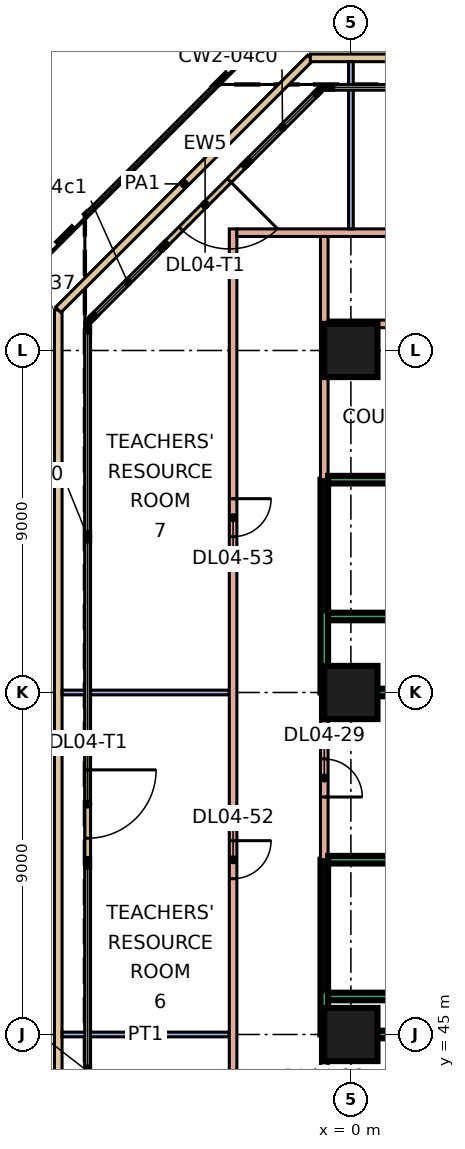
"""IFC4 building model, lengths in metres.
Left out: names, types, materials, properties, quantities, classifications, styles, units other than length and angle.
Written with IfcOpenShell. Run it as: python <this file> out.ifc"""

import sys

from ifc_helpers import new_model, si_unit, direction, frame, frame_2d, origin, origin_2d, place, context, subcontext, project, spatial, rectangle, extrude, element, fill, save


model = new_model("IFC4")
c1 = context("Model", 3, precision=1e-05, world=origin(), true_north=direction((0.0, 1.0)))
c2 = subcontext(c1, "Body", "Model", "MODEL_VIEW")
j1 = project(units=[si_unit("LENGTHUNIT", "METRE"), si_unit("PLANEANGLEUNIT", "RADIAN")], contexts=[c1])
p1 = place(None, origin())
s1 = spatial("IfcSite", under=j1, at=p1, CompositionType="ELEMENT")
p2 = place(p1, origin())
s2 = spatial("IfcBuilding", under=s1, at=p2, CompositionType="ELEMENT")
p3 = place(p2, frame((0.0, 0.0, 21.6)))
s3 = spatial("IfcBuildingStorey", under=s2, at=p3, CompositionType="ELEMENT", Elevation=21.6)
for number, where, z_axis, x_axis in (
    (1, (0.0, 45.0, 0.0), (0.0, 0.0, 1.0), (1.0, 0.0, 0.0)),
    (2, (0.0, 54.0, 0.0), (0.0, 0.0, 1.0), (1.0, 0.0, 0.0)),
    (3, (0.0, 63.0, 0.0), (0.0, 0.0, 1.0), (1.0, 0.0, 0.0)),
):
    element("IfcColumn", number, at=place(p3, frame(where, z_axis=z_axis, x_axis=x_axis)), inside=s3, PredefinedType="COLUMN", context=c2, shape_type="SweptSolid", body=[
        extrude(rectangle(XDim=1.4, YDim=1.4, at=origin_2d()), origin(), (0.0, 0.0, 1.0), 4.8),
    ])
p4 = place(p3, frame((-2.775, 67.897, 0.0), z_axis=(0.0, 0.0, 1.0), x_axis=(-0.707106781187, -0.707106781187, 0.0)))
e4 = element("IfcWall", 4, at=p4, inside=s3, PredefinedType="SOLIDWALL", context=c2, shape_type="SweptSolid", body=[
    extrude(rectangle(XDim=3.0, YDim=0.15, at=frame_2d((1.5, 0.0))), origin(), (0.0, 0.0, 1.0), 4.4),
])
p5 = place(p4, frame((0.6, 0.0, 0.0)))
e5 = element("IfcOpeningElement", 5, at=p5, cuts=e4, PredefinedType="OPENING", context=c2, shape_type="SweptSolid", body=[
    extrude(rectangle(XDim=1.8, YDim=2.4, at=frame_2d((0.9, 1.2))), frame((0.0, 0.085, 0.0), z_axis=(0.0, -1.0, 0.0), x_axis=(1.0, 0.0, 0.0)), (0.0, 0.0, 1.0), 0.17),
])
p6 = place(p3, frame((-6.925, 52.564, 0.0), z_axis=(0.0, 0.0, 1.0), x_axis=(0.0, -1.0, 0.0)))
e6 = element("IfcWall", 6, at=p6, inside=s3, PredefinedType="SOLIDWALL", context=c2, shape_type="SweptSolid", body=[
    extrude(rectangle(XDim=3.0, YDim=0.15, at=frame_2d((1.5, 0.0))), origin(), (0.0, 0.0, 1.0), 4.4),
])
p7 = place(p6, frame((0.6, 0.0, 0.0)))
e7 = element("IfcOpeningElement", 7, at=p7, cuts=e6, PredefinedType="OPENING", context=c2, shape_type="SweptSolid", body=[
    extrude(rectangle(XDim=1.8, YDim=2.4, at=frame_2d((0.9, 1.2))), frame((0.0, 0.085, 0.0), z_axis=(0.0, -1.0, 0.0), x_axis=(1.0, 0.0, 0.0)), (0.0, 0.0, 1.0), 0.17),
])
p8 = place(p3, frame((-7.7, 9.932, 0.0), z_axis=(0.0, 0.0, 1.0), x_axis=(0.0, 1.0, 0.0)))
e8 = element("IfcWall", 8, at=p8, inside=s3, PredefinedType="PARAPET", context=c2, shape_type="SweptSolid", body=[
    extrude(rectangle(XDim=54.136, YDim=0.2, at=frame_2d((27.068, 0.0))), origin(), (0.0, 0.0, 1.0), 0.5),
])
p9 = place(p3, frame((-7.7, 64.068, 0.0), z_axis=(0.0, 0.0, 1.0), x_axis=(0.707106781187, 0.707106781187, 0.0)))
e9 = element("IfcWall", 9, at=p9, inside=s3, PredefinedType="PARAPET", context=c2, shape_type="SweptSolid", body=[
    extrude(rectangle(XDim=9.379, YDim=0.2, at=frame_2d((4.689, 0.0))), origin(), (0.0, 0.0, 1.0), 0.5),
])
p10 = place(p3, frame((-1.068, 70.7, 0.0), z_axis=(0.0, 0.0, 1.0), x_axis=(1.0, 0.0, 0.0)))
e10 = element("IfcWall", 10, at=p10, inside=s3, PredefinedType="PARAPET", context=c2, shape_type="SweptSolid", body=[
    extrude(rectangle(XDim=26.136, YDim=0.2, at=frame_2d((13.068, 0.0))), origin(), (0.0, 0.0, 1.0), 0.5),
])
for number, where, z_axis, x_axis in (
    (11, (-7.6, 45.0, 0.0), (0.0, 0.0, 1.0), (1.0, 0.0, 0.0)),
    (12, (-7.6, 54.0, 0.0), (0.0, 0.0, 1.0), (1.0, 0.0, 0.0)),
):
    element("IfcWall", number, at=place(p3, frame(where, z_axis=z_axis, x_axis=x_axis)), inside=s3, PredefinedType="PARTITIONING", context=c2, shape_type="SweptSolid", body=[
        extrude(rectangle(XDim=4.4, YDim=0.125, at=frame_2d((2.2, 0.0))), origin(), (0.0, 0.0, 1.0), 4.4),
    ])
p11 = place(p3, frame((-3.1, 5.473, 0.0), z_axis=(0.0, 0.0, 1.0), x_axis=(0.0, 1.0, 0.0)))
e13 = element("IfcWall", 13, at=p11, inside=s3, PredefinedType="PARTITIONING", context=c2, shape_type="SweptSolid", body=[
    extrude(rectangle(XDim=60.727, YDim=0.2, at=frame_2d((30.363, 0.0))), origin(), (0.0, 0.0, 1.0), 4.4),
])
p12 = place(p11, frame((12.127, 0.0, 0.0)))
e14 = element("IfcOpeningElement", 14, at=p12, cuts=e13, PredefinedType="OPENING", context=c2, shape_type="SweptSolid", body=[
    extrude(rectangle(XDim=1.0, YDim=2.1, at=frame_2d((0.5, 1.05))), frame((0.0, 0.11, 0.0), z_axis=(0.0, -1.0, 0.0), x_axis=(1.0, 0.0, 0.0)), (0.0, 0.0, 1.0), 0.22),
])
p13 = place(p11, frame((24.127, 0.0, 0.0)))
e15 = element("IfcOpeningElement", 15, at=p13, cuts=e13, PredefinedType="OPENING", context=c2, shape_type="SweptSolid", body=[
    extrude(rectangle(XDim=1.0, YDim=2.1, at=frame_2d((0.5, 1.05))), frame((0.0, 0.11, 0.0), z_axis=(0.0, -1.0, 0.0), x_axis=(1.0, 0.0, 0.0)), (0.0, 0.0, 1.0), 0.22),
])
p14 = place(p11, frame((34.627, 0.0, 0.0)))
e16 = element("IfcOpeningElement", 16, at=p14, cuts=e13, PredefinedType="OPENING", context=c2, shape_type="SweptSolid", body=[
    extrude(rectangle(XDim=1.0, YDim=2.1, at=frame_2d((0.5, 1.05))), frame((0.0, 0.11, 0.0), z_axis=(0.0, -1.0, 0.0), x_axis=(1.0, 0.0, 0.0)), (0.0, 0.0, 1.0), 0.22),
])
p15 = place(p11, frame((43.627, 0.0, 0.0)))
e17 = element("IfcOpeningElement", 17, at=p15, cuts=e13, PredefinedType="OPENING", context=c2, shape_type="SweptSolid", body=[
    extrude(rectangle(XDim=1.0, YDim=2.1, at=frame_2d((0.5, 1.05))), frame((0.0, 0.11, 0.0), z_axis=(0.0, -1.0, 0.0), x_axis=(1.0, 0.0, 0.0)), (0.0, 0.0, 1.0), 0.22),
])
p16 = place(p11, frame((52.627, 0.0, 0.0)))
e18 = element("IfcOpeningElement", 18, at=p16, cuts=e13, PredefinedType="OPENING", context=c2, shape_type="SweptSolid", body=[
    extrude(rectangle(XDim=1.0, YDim=2.1, at=frame_2d((0.5, 1.05))), frame((0.0, 0.11, 0.0), z_axis=(0.0, -1.0, 0.0), x_axis=(1.0, 0.0, 0.0)), (0.0, 0.0, 1.0), 0.22),
])
p17 = place(p3, frame((-3.0, 66.1, 0.0), z_axis=(0.0, 0.0, 1.0), x_axis=(1.0, 0.0, 0.0)))
e19 = element("IfcWall", 19, at=p17, inside=s3, PredefinedType="PARTITIONING", context=c2, shape_type="SweptSolid", body=[
    extrude(rectangle(XDim=30.0, YDim=0.2, at=frame_2d((15.0, 0.0))), origin(), (0.0, 0.0, 1.0), 4.4),
])
p18 = place(p17, frame((8.6, 0.0, 0.0)))
e20 = element("IfcOpeningElement", 20, at=p18, cuts=e19, PredefinedType="OPENING", context=c2, shape_type="SweptSolid", body=[
    extrude(rectangle(XDim=1.0, YDim=2.1, at=frame_2d((0.5, 1.05))), frame((0.0, 0.11, 0.0), z_axis=(0.0, -1.0, 0.0), x_axis=(1.0, 0.0, 0.0)), (0.0, 0.0, 1.0), 0.22),
])
p19 = place(p17, frame((22.35, 0.0, 0.0)))
e21 = element("IfcOpeningElement", 21, at=p19, cuts=e19, PredefinedType="OPENING", context=c2, shape_type="SweptSolid", body=[
    extrude(rectangle(XDim=1.0, YDim=2.1, at=frame_2d((0.5, 1.05))), frame((0.0, 0.11, 0.0), z_axis=(0.0, -1.0, 0.0), x_axis=(1.0, 0.0, 0.0)), (0.0, 0.0, 1.0), 0.22),
])
p20 = place(p3, frame((-0.7, 40.6, 0.0), z_axis=(0.0, 0.0, 1.0), x_axis=(0.0, 1.0, 0.0)))
e22 = element("IfcWall", 22, at=p20, inside=s3, PredefinedType="PARTITIONING", context=c2, shape_type="SweptSolid", body=[
    extrude(rectangle(XDim=4.4, YDim=0.2, at=frame_2d((2.2, 0.0))), origin(), (0.0, 0.0, 1.0), 4.4),
])
p21 = place(p20, frame((1.65, 0.0, 0.0)))
e23 = element("IfcOpeningElement", 23, at=p21, cuts=e22, PredefinedType="OPENING", context=c2, shape_type="SweptSolid", body=[
    extrude(rectangle(XDim=1.0, YDim=2.1, at=frame_2d((0.5, 1.05))), frame((0.0, 0.11, 0.0), z_axis=(0.0, -1.0, 0.0), x_axis=(1.0, 0.0, 0.0)), (0.0, 0.0, 1.0), 0.22),
])
p22 = place(p3, frame((-0.7, 45.0, 0.0), z_axis=(0.0, 0.0, 1.0), x_axis=(0.0, 1.0, 0.0)))
e24 = element("IfcWall", 24, at=p22, inside=s3, PredefinedType="SOLIDWALL", context=c2, shape_type="SweptSolid", body=[
    extrude(rectangle(XDim=4.6, YDim=0.2, at=frame_2d((2.3, 0.0))), origin(), (0.0, 0.0, 1.0), 4.4),
])
p23 = place(p3, frame((-0.7, 49.6, 0.0), z_axis=(0.0, 0.0, 1.0), x_axis=(0.0, 1.0, 0.0)))
e25 = element("IfcWall", 25, at=p23, inside=s3, PredefinedType="PARTITIONING", context=c2, shape_type="SweptSolid", body=[
    extrude(rectangle(XDim=4.4, YDim=0.2, at=frame_2d((2.2, 0.0))), origin(), (0.0, 0.0, 1.0), 4.4),
])
p24 = place(p23, frame((1.65, 0.0, 0.0)))
e26 = element("IfcOpeningElement", 26, at=p24, cuts=e25, PredefinedType="OPENING", context=c2, shape_type="SweptSolid", body=[
    extrude(rectangle(XDim=1.0, YDim=2.1, at=frame_2d((0.5, 1.05))), frame((0.0, 0.11, 0.0), z_axis=(0.0, -1.0, 0.0), x_axis=(1.0, 0.0, 0.0)), (0.0, 0.0, 1.0), 0.22),
])
p25 = place(p3, frame((-0.7, 54.0, 0.0), z_axis=(0.0, 0.0, 1.0), x_axis=(0.0, 1.0, 0.0)))
e27 = element("IfcWall", 27, at=p25, inside=s3, PredefinedType="SOLIDWALL", context=c2, shape_type="SweptSolid", body=[
    extrude(rectangle(XDim=5.6, YDim=0.2, at=frame_2d((2.8, 0.0))), origin(), (0.0, 0.0, 1.0), 4.4),
])
p26 = place(p3, frame((-0.7, 59.6, 0.0), z_axis=(0.0, 0.0, 1.0), x_axis=(0.0, 1.0, 0.0)))
e28 = element("IfcWall", 28, at=p26, inside=s3, PredefinedType="PARTITIONING", context=c2, shape_type="SweptSolid", body=[
    extrude(rectangle(XDim=6.4, YDim=0.2, at=frame_2d((3.2, 0.0))), origin(), (0.0, 0.0, 1.0), 4.4),
])
for number, where, z_axis, x_axis in (
    (29, (-0.6, 45.0, 0.0), (0.0, 0.0, 1.0), (1.0, 0.0, 0.0)),
    (30, (-0.6, 49.6, 0.0), (0.0, 0.0, 1.0), (1.0, 0.0, 0.0)),
    (31, (-0.6, 54.0, 0.0), (0.0, 0.0, 1.0), (1.0, 0.0, 0.0)),
    (32, (-0.6, 59.6, 0.0), (0.0, 0.0, 1.0), (1.0, 0.0, 0.0)),
):
    element("IfcWall", number, at=place(p3, frame(where, z_axis=z_axis, x_axis=x_axis)), inside=s3, PredefinedType="SOLIDWALL", context=c2, shape_type="SweptSolid", body=[
        extrude(rectangle(XDim=13.1, YDim=0.2, at=frame_2d((6.55, 0.0))), origin(), (0.0, 0.0, 1.0), 4.4),
    ])
p27 = place(p3, frame((-0.6, 63.7, 0.0), z_axis=(0.0, 0.0, 1.0), x_axis=(1.0, 0.0, 0.0)))
e33 = element("IfcWall", 33, at=p27, inside=s3, PredefinedType="PARTITIONING", context=c2, shape_type="SweptSolid", body=[
    extrude(rectangle(XDim=13.3, YDim=0.2, at=frame_2d((6.65, 0.0))), origin(), (0.0, 0.0, 1.0), 4.4),
])
p28 = place(p27, frame((6.05, 0.0, 0.0)))
e34 = element("IfcOpeningElement", 34, at=p28, cuts=e33, PredefinedType="OPENING", context=c2, shape_type="SweptSolid", body=[
    extrude(rectangle(XDim=1.0, YDim=2.1, at=frame_2d((0.5, 1.05))), frame((0.0, 0.11, 0.0), z_axis=(0.0, -1.0, 0.0), x_axis=(1.0, 0.0, 0.0)), (0.0, 0.0, 1.0), 0.22),
])
p29 = place(p3, frame((0.0, 66.2, 0.0), z_axis=(0.0, 0.0, 1.0), x_axis=(0.0, 1.0, 0.0)))
e35 = element("IfcWall", 35, at=p29, inside=s3, PredefinedType="PARTITIONING", context=c2, shape_type="SweptSolid", body=[
    extrude(rectangle(XDim=4.4, YDim=0.125, at=frame_2d((2.2, 0.0))), origin(), (0.0, 0.0, 1.0), 4.4),
])
for number, where, z_axis, x_axis in (
    (36, (-0.6, 56.0, 0.0), (0.0, 0.0, 1.0), (1.0, 0.0, 0.0)),
    (37, (-0.6, 46.0, 0.0), (0.0, 0.0, 1.0), (1.0, 0.0, 0.0)),
):
    element("IfcWall", number, at=place(p3, frame(where, z_axis=z_axis, x_axis=x_axis)), inside=s3, PredefinedType="SOLIDWALL", context=c2, shape_type="SweptSolid", body=[
        extrude(rectangle(XDim=7.945, YDim=0.2, at=frame_2d((3.973, 0.0))), origin(), (0.0, 0.0, 1.0), 4.4),
    ])
p30 = place(p5, origin())
e38 = element("IfcDoor", 38, at=p30, inside=s3, OperationType="DOUBLE_DOOR_SINGLE_SWING", PredefinedType="DOOR", context=c2, shape_type="SweptSolid", body=[
    extrude(rectangle(XDim=1.8, YDim=2.4, at=frame_2d((0.9, 1.2))), frame((0.0, 0.025, 0.0), z_axis=(0.0, -1.0, 0.0), x_axis=(1.0, 0.0, 0.0)), (0.0, 0.0, 1.0), 0.05),
])
fill(e5, e38)
p31 = place(p7, origin())
e39 = element("IfcDoor", 39, at=p31, inside=s3, OperationType="DOUBLE_DOOR_SINGLE_SWING", PredefinedType="DOOR", context=c2, shape_type="SweptSolid", body=[
    extrude(rectangle(XDim=1.8, YDim=2.4, at=frame_2d((0.9, 1.2))), frame((0.0, 0.025, 0.0), z_axis=(0.0, -1.0, 0.0), x_axis=(1.0, 0.0, 0.0)), (0.0, 0.0, 1.0), 0.05),
])
fill(e7, e39)
p32 = place(p24, frame((1.0, 0.0, 0.0), z_axis=(0.0, 0.0, 1.0), x_axis=(-1.0, 0.0, 0.0)))
e40 = element("IfcDoor", 40, at=p32, inside=s3, OperationType="SINGLE_SWING_LEFT", PredefinedType="DOOR", context=c2, shape_type="SweptSolid", body=[
    extrude(rectangle(XDim=1.0, YDim=2.1, at=frame_2d((0.5, 1.05))), frame((0.0, 0.025, 0.0), z_axis=(0.0, -1.0, 0.0), x_axis=(1.0, 0.0, 0.0)), (0.0, 0.0, 1.0), 0.05),
])
fill(e26, e40)
p33 = place(p15, origin())
e41 = element("IfcDoor", 41, at=p33, inside=s3, OperationType="SINGLE_SWING_RIGHT", PredefinedType="DOOR", context=c2, shape_type="SweptSolid", body=[
    extrude(rectangle(XDim=1.0, YDim=2.1, at=frame_2d((0.5, 1.05))), frame((0.0, 0.025, 0.0), z_axis=(0.0, -1.0, 0.0), x_axis=(1.0, 0.0, 0.0)), (0.0, 0.0, 1.0), 0.05),
])
fill(e17, e41)
p34 = place(p16, origin())
e42 = element("IfcDoor", 42, at=p34, inside=s3, OperationType="SINGLE_SWING_RIGHT", PredefinedType="DOOR", context=c2, shape_type="SweptSolid", body=[
    extrude(rectangle(XDim=1.0, YDim=2.1, at=frame_2d((0.5, 1.05))), frame((0.0, 0.025, 0.0), z_axis=(0.0, -1.0, 0.0), x_axis=(1.0, 0.0, 0.0)), (0.0, 0.0, 1.0), 0.05),
])
fill(e18, e42)
save(model, sys.argv[1])
